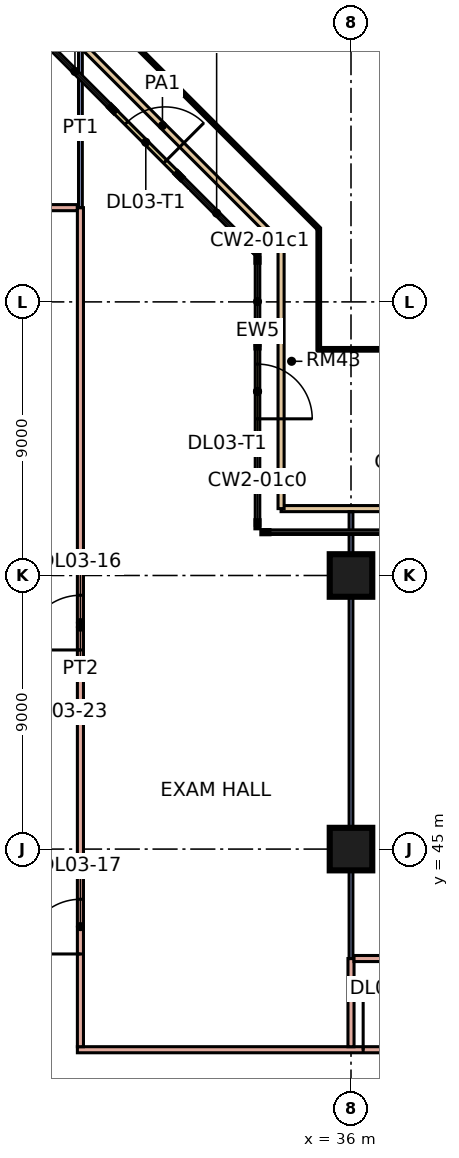
"""IFC4 building model, lengths in metres.
Left out: names, types, materials, properties, quantities, classifications, styles, units other than length and angle.
Written with IfcOpenShell. Run it as: python <this file> out.ifc"""

import sys

from ifc_helpers import new_model, si_unit, direction, frame, frame_2d, origin, origin_2d, place, context, subcontext, project, spatial, rectangle, extrude, element, fill, save


model = new_model("IFC4")
c1 = context("Model", 3, precision=1e-05, world=origin(), true_north=direction((0.0, 1.0)))
c2 = subcontext(c1, "Body", "Model", "MODEL_VIEW")
j1 = project(units=[si_unit("LENGTHUNIT", "METRE"), si_unit("PLANEANGLEUNIT", "RADIAN")], contexts=[c1])
p1 = place(None, origin())
s1 = spatial("IfcSite", under=j1, at=p1, CompositionType="ELEMENT")
p2 = place(p1, origin())
s2 = spatial("IfcBuilding", under=s1, at=p2, CompositionType="ELEMENT")
p3 = place(p2, frame((0.0, 0.0, 16.8)))
s3 = spatial("IfcBuildingStorey", under=s2, at=p3, CompositionType="ELEMENT", Elevation=16.8)
for number, where, z_axis, x_axis in (
    (1, (36.0, 45.0, 0.0), (0.0, 0.0, 1.0), (1.0, 0.0, 0.0)),
    (2, (36.0, 54.0, 0.0), (0.0, 0.0, 1.0), (1.0, 0.0, 0.0)),
):
    element("IfcColumn", number, at=place(p3, frame(where, z_axis=z_axis, x_axis=x_axis)), inside=s3, PredefinedType="COLUMN", context=c2, shape_type="SweptSolid", body=[
        extrude(rectangle(XDim=1.4, YDim=1.4, at=origin_2d()), origin(), (0.0, 0.0, 1.0), 4.8),
    ])
p4 = place(p3, frame((32.925, 58.553, 0.0), z_axis=(0.0, 0.0, 1.0), x_axis=(0.0, 1.0, 0.0)))
e3 = element("IfcWall", 3, at=p4, inside=s3, PredefinedType="SOLIDWALL", context=c2, shape_type="SweptSolid", body=[
    extrude(rectangle(XDim=3.0, YDim=0.15, at=frame_2d((1.5, 0.0))), origin(), (0.0, 0.0, 1.0), 4.4),
])
p5 = place(p4, frame((0.6, 0.0, 0.0)))
e4 = element("IfcOpeningElement", 4, at=p5, cuts=e3, PredefinedType="OPENING", context=c2, shape_type="SweptSolid", body=[
    extrude(rectangle(XDim=1.8, YDim=2.4, at=frame_2d((0.9, 1.2))), frame((0.0, 0.085, 0.0), z_axis=(0.0, -1.0, 0.0), x_axis=(1.0, 0.0, 0.0)), (0.0, 0.0, 1.0), 0.17),
])
p6 = place(p3, frame((30.311, 67.19, 0.0), z_axis=(0.0, 0.0, 1.0), x_axis=(-0.707106781187, 0.707106781187, 0.0)))
e5 = element("IfcWall", 5, at=p6, inside=s3, PredefinedType="SOLIDWALL", context=c2, shape_type="SweptSolid", body=[
    extrude(rectangle(XDim=3.0, YDim=0.15, at=frame_2d((1.5, 0.0))), origin(), (0.0, 0.0, 1.0), 4.4),
])
p7 = place(p6, frame((0.6, 0.0, 0.0)))
e6 = element("IfcOpeningElement", 6, at=p7, cuts=e5, PredefinedType="OPENING", context=c2, shape_type="SweptSolid", body=[
    extrude(rectangle(XDim=1.8, YDim=2.4, at=frame_2d((0.9, 1.2))), frame((0.0, 0.085, 0.0), z_axis=(0.0, -1.0, 0.0), x_axis=(1.0, 0.0, 0.0)), (0.0, 0.0, 1.0), 0.17),
])
p8 = place(p3, frame((33.7, 56.2, 0.0), z_axis=(0.0, 0.0, 1.0), x_axis=(1.0, 0.0, 0.0)))
e7 = element("IfcWall", 7, at=p8, inside=s3, PredefinedType="PARAPET", context=c2, shape_type="SweptSolid", body=[
    extrude(rectangle(XDim=22.5, YDim=0.2, at=frame_2d((11.25, 0.0))), origin(), (0.0, 0.0, 1.0), 0.5),
])
p9 = place(p3, frame((25.896, 72.7, 0.0), z_axis=(0.0, 0.0, 1.0), x_axis=(0.707106781187, -0.707106781187, 0.0)))
e8 = element("IfcWall", 8, at=p9, inside=s3, PredefinedType="PARAPET", context=c2, shape_type="SweptSolid", body=[
    extrude(rectangle(XDim=11.036, YDim=0.2, at=frame_2d((5.518, 0.0))), origin(), (0.0, 0.0, 1.0), 0.5),
])
p10 = place(p3, frame((33.7, 64.896, 0.0), z_axis=(0.0, 0.0, 1.0), x_axis=(0.0, -1.0, 0.0)))
e9 = element("IfcWall", 9, at=p10, inside=s3, PredefinedType="PARAPET", context=c2, shape_type="SweptSolid", body=[
    extrude(rectangle(XDim=8.697, YDim=0.2, at=frame_2d((4.348, 0.0))), origin(), (0.0, 0.0, 1.0), 0.5),
])
p11 = place(p3, frame((-3.0, 66.1, 0.0), z_axis=(0.0, 0.0, 1.0), x_axis=(1.0, 0.0, 0.0)))
e10 = element("IfcWall", 10, at=p11, inside=s3, PredefinedType="PARTITIONING", context=c2, shape_type="SweptSolid", body=[
    extrude(rectangle(XDim=30.0, YDim=0.2, at=frame_2d((15.0, 0.0))), origin(), (0.0, 0.0, 1.0), 4.4),
])
p12 = place(p11, frame((8.6, 0.0, 0.0)))
e11 = element("IfcOpeningElement", 11, at=p12, cuts=e10, PredefinedType="OPENING", context=c2, shape_type="SweptSolid", body=[
    extrude(rectangle(XDim=1.0, YDim=2.1, at=frame_2d((0.5, 1.05))), frame((0.0, 0.11, 0.0), z_axis=(0.0, -1.0, 0.0), x_axis=(1.0, 0.0, 0.0)), (0.0, 0.0, 1.0), 0.22),
])
p13 = place(p11, frame((22.35, 0.0, 0.0)))
e12 = element("IfcOpeningElement", 12, at=p13, cuts=e10, PredefinedType="OPENING", context=c2, shape_type="SweptSolid", body=[
    extrude(rectangle(XDim=1.0, YDim=2.1, at=frame_2d((0.5, 1.05))), frame((0.0, 0.11, 0.0), z_axis=(0.0, -1.0, 0.0), x_axis=(1.0, 0.0, 0.0)), (0.0, 0.0, 1.0), 0.22),
])
p14 = place(p3, frame((27.0, 38.4, 0.0), z_axis=(0.0, 0.0, 1.0), x_axis=(1.0, 0.0, 0.0)))
e13 = element("IfcWall", 13, at=p14, inside=s3, PredefinedType="PARTITIONING", context=c2, shape_type="SweptSolid", body=[
    extrude(rectangle(XDim=29.1, YDim=0.2, at=frame_2d((14.55, 0.0))), origin(), (0.0, 0.0, 1.0), 4.4),
])
p15 = place(p14, frame((21.9, 0.0, 0.0)))
e14 = element("IfcOpeningElement", 14, at=p15, cuts=e13, PredefinedType="OPENING", context=c2, shape_type="SweptSolid", body=[
    extrude(rectangle(XDim=1.0, YDim=2.1, at=frame_2d((0.5, 1.05))), frame((0.0, 0.11, 0.0), z_axis=(0.0, -1.0, 0.0), x_axis=(1.0, 0.0, 0.0)), (0.0, 0.0, 1.0), 0.22),
])
p16 = place(p14, frame((9.4, 0.0, 0.0)))
e15 = element("IfcOpeningElement", 15, at=p16, cuts=e13, PredefinedType="OPENING", context=c2, shape_type="SweptSolid", body=[
    extrude(rectangle(XDim=1.8, YDim=2.1, at=frame_2d((0.9, 1.05))), frame((0.0, 0.11, 0.0), z_axis=(0.0, -1.0, 0.0), x_axis=(1.0, 0.0, 0.0)), (0.0, 0.0, 1.0), 0.22),
])
p17 = place(p3, frame((27.1, 38.5, 0.0), z_axis=(0.0, 0.0, 1.0), x_axis=(0.0, 1.0, 0.0)))
e16 = element("IfcWall", 16, at=p17, inside=s3, PredefinedType="PARTITIONING", context=c2, shape_type="SweptSolid", body=[
    extrude(rectangle(XDim=27.6, YDim=0.2, at=frame_2d((13.8, 0.0))), origin(), (0.0, 0.0, 1.0), 4.4),
])
p18 = place(p17, frame((13.05, 0.0, 0.0)))
e17 = element("IfcOpeningElement", 17, at=p18, cuts=e16, PredefinedType="OPENING", context=c2, shape_type="SweptSolid", body=[
    extrude(rectangle(XDim=1.8, YDim=2.1, at=frame_2d((0.9, 1.05))), frame((0.0, 0.11, 0.0), z_axis=(0.0, -1.0, 0.0), x_axis=(1.0, 0.0, 0.0)), (0.0, 0.0, 1.0), 0.22),
])
p19 = place(p17, frame((3.05, 0.0, 0.0)))
e18 = element("IfcOpeningElement", 18, at=p19, cuts=e16, PredefinedType="OPENING", context=c2, shape_type="SweptSolid", body=[
    extrude(rectangle(XDim=1.8, YDim=2.1, at=frame_2d((0.9, 1.05))), frame((0.0, 0.11, 0.0), z_axis=(0.0, -1.0, 0.0), x_axis=(1.0, 0.0, 0.0)), (0.0, 0.0, 1.0), 0.22),
])
p20 = place(p3, frame((27.1, 66.1, 0.0), z_axis=(0.0, 0.0, 1.0), x_axis=(0.0, 1.0, 0.0)))
e19 = element("IfcWall", 19, at=p20, inside=s3, PredefinedType="PARTITIONING", context=c2, shape_type="SweptSolid", body=[
    extrude(rectangle(XDim=5.255, YDim=0.125, at=frame_2d((2.627, 0.0))), origin(), (0.0, 0.0, 1.0), 4.4),
])
p21 = place(p3, frame((36.0, 38.5, 0.0), z_axis=(0.0, 0.0, 1.0), x_axis=(0.0, 1.0, 0.0)))
e20 = element("IfcWall", 20, at=p21, inside=s3, PredefinedType="PARTITIONING", context=c2, shape_type="SweptSolid", body=[
    extrude(rectangle(XDim=2.9, YDim=0.2, at=frame_2d((1.45, 0.0))), origin(), (0.0, 0.0, 1.0), 4.4),
])
p22 = place(p3, frame((36.0, 41.4, 0.0), z_axis=(0.0, 0.0, 1.0), x_axis=(0.0, 1.0, 0.0)))
e21 = element("IfcWall", 21, at=p22, inside=s3, PredefinedType="PARTITIONING", context=c2, shape_type="SweptSolid", body=[
    extrude(rectangle(XDim=14.7, YDim=0.125, at=frame_2d((7.35, 0.0))), origin(), (0.0, 0.0, 1.0), 4.4),
])
p23 = place(p3, frame((36.1, 41.4, 0.0), z_axis=(0.0, 0.0, 1.0), x_axis=(1.0, 0.0, 0.0)))
e22 = element("IfcWall", 22, at=p23, inside=s3, PredefinedType="PARTITIONING", context=c2, shape_type="SweptSolid", body=[
    extrude(rectangle(XDim=20.0, YDim=0.2, at=frame_2d((10.0, 0.0))), origin(), (0.0, 0.0, 1.0), 4.4),
])
p24 = place(p23, frame((4.0, 0.0, 0.0)))
e23 = element("IfcOpeningElement", 23, at=p24, cuts=e22, PredefinedType="OPENING", context=c2, shape_type="SweptSolid", body=[
    extrude(rectangle(XDim=1.0, YDim=2.1, at=frame_2d((0.5, 1.05))), frame((0.0, 0.11, 0.0), z_axis=(0.0, -1.0, 0.0), x_axis=(1.0, 0.0, 0.0)), (0.0, 0.0, 1.0), 0.22),
])
p25 = place(p23, frame((7.75, 0.0, 0.0)))
e24 = element("IfcOpeningElement", 24, at=p25, cuts=e22, PredefinedType="OPENING", context=c2, shape_type="SweptSolid", body=[
    extrude(rectangle(XDim=1.0, YDim=2.1, at=frame_2d((0.5, 1.05))), frame((0.0, 0.11, 0.0), z_axis=(0.0, -1.0, 0.0), x_axis=(1.0, 0.0, 0.0)), (0.0, 0.0, 1.0), 0.22),
])
p26 = place(p23, frame((13.0, 0.0, 0.0)))
e25 = element("IfcOpeningElement", 25, at=p26, cuts=e22, PredefinedType="OPENING", context=c2, shape_type="SweptSolid", body=[
    extrude(rectangle(XDim=1.0, YDim=2.1, at=frame_2d((0.5, 1.05))), frame((0.0, 0.11, 0.0), z_axis=(0.0, -1.0, 0.0), x_axis=(1.0, 0.0, 0.0)), (0.0, 0.0, 1.0), 0.22),
])
p27 = place(p23, frame((16.75, 0.0, 0.0)))
e26 = element("IfcOpeningElement", 26, at=p27, cuts=e22, PredefinedType="OPENING", context=c2, shape_type="SweptSolid", body=[
    extrude(rectangle(XDim=1.0, YDim=2.1, at=frame_2d((0.5, 1.05))), frame((0.0, 0.11, 0.0), z_axis=(0.0, -1.0, 0.0), x_axis=(1.0, 0.0, 0.0)), (0.0, 0.0, 1.0), 0.22),
])
p28 = place(p5, frame((1.8, 0.0, 0.0), z_axis=(0.0, 0.0, 1.0), x_axis=(-1.0, 0.0, 0.0)))
e27 = element("IfcDoor", 27, at=p28, inside=s3, OperationType="DOUBLE_DOOR_SINGLE_SWING", PredefinedType="DOOR", context=c2, shape_type="SweptSolid", body=[
    extrude(rectangle(XDim=1.8, YDim=2.4, at=frame_2d((0.9, 1.2))), frame((0.0, 0.025, 0.0), z_axis=(0.0, -1.0, 0.0), x_axis=(1.0, 0.0, 0.0)), (0.0, 0.0, 1.0), 0.05),
])
fill(e4, e27)
p29 = place(p7, frame((1.8, 0.0, 0.0), z_axis=(0.0, 0.0, 1.0), x_axis=(-1.0, 0.0, 0.0)))
e28 = element("IfcDoor", 28, at=p29, inside=s3, OperationType="DOUBLE_DOOR_SINGLE_SWING", PredefinedType="DOOR", context=c2, shape_type="SweptSolid", body=[
    extrude(rectangle(XDim=1.8, YDim=2.4, at=frame_2d((0.9, 1.2))), frame((0.0, 0.025, 0.0), z_axis=(0.0, -1.0, 0.0), x_axis=(1.0, 0.0, 0.0)), (0.0, 0.0, 1.0), 0.05),
])
fill(e6, e28)
p30 = place(p18, origin())
e29 = element("IfcDoor", 29, at=p30, inside=s3, OperationType="DOUBLE_DOOR_SINGLE_SWING", PredefinedType="DOOR", context=c2, shape_type="SweptSolid", body=[
    extrude(rectangle(XDim=1.8, YDim=2.1, at=frame_2d((0.9, 1.05))), frame((0.0, 0.025, 0.0), z_axis=(0.0, -1.0, 0.0), x_axis=(1.0, 0.0, 0.0)), (0.0, 0.0, 1.0), 0.05),
])
fill(e17, e29)
p31 = place(p19, origin())
e30 = element("IfcDoor", 30, at=p31, inside=s3, OperationType="DOUBLE_DOOR_SINGLE_SWING", PredefinedType="DOOR", context=c2, shape_type="SweptSolid", body=[
    extrude(rectangle(XDim=1.8, YDim=2.1, at=frame_2d((0.9, 1.05))), frame((0.0, 0.025, 0.0), z_axis=(0.0, -1.0, 0.0), x_axis=(1.0, 0.0, 0.0)), (0.0, 0.0, 1.0), 0.05),
])
fill(e18, e30)
p32 = place(p16, origin())
e31 = element("IfcDoor", 31, at=p32, inside=s3, OperationType="DOUBLE_DOOR_SINGLE_SWING", PredefinedType="DOOR", context=c2, shape_type="SweptSolid", body=[
    extrude(rectangle(XDim=1.8, YDim=2.1, at=frame_2d((0.9, 1.05))), frame((0.0, 0.025, 0.0), z_axis=(0.0, -1.0, 0.0), x_axis=(1.0, 0.0, 0.0)), (0.0, 0.0, 1.0), 0.05),
])
fill(e15, e31)
save(model, sys.argv[1])
